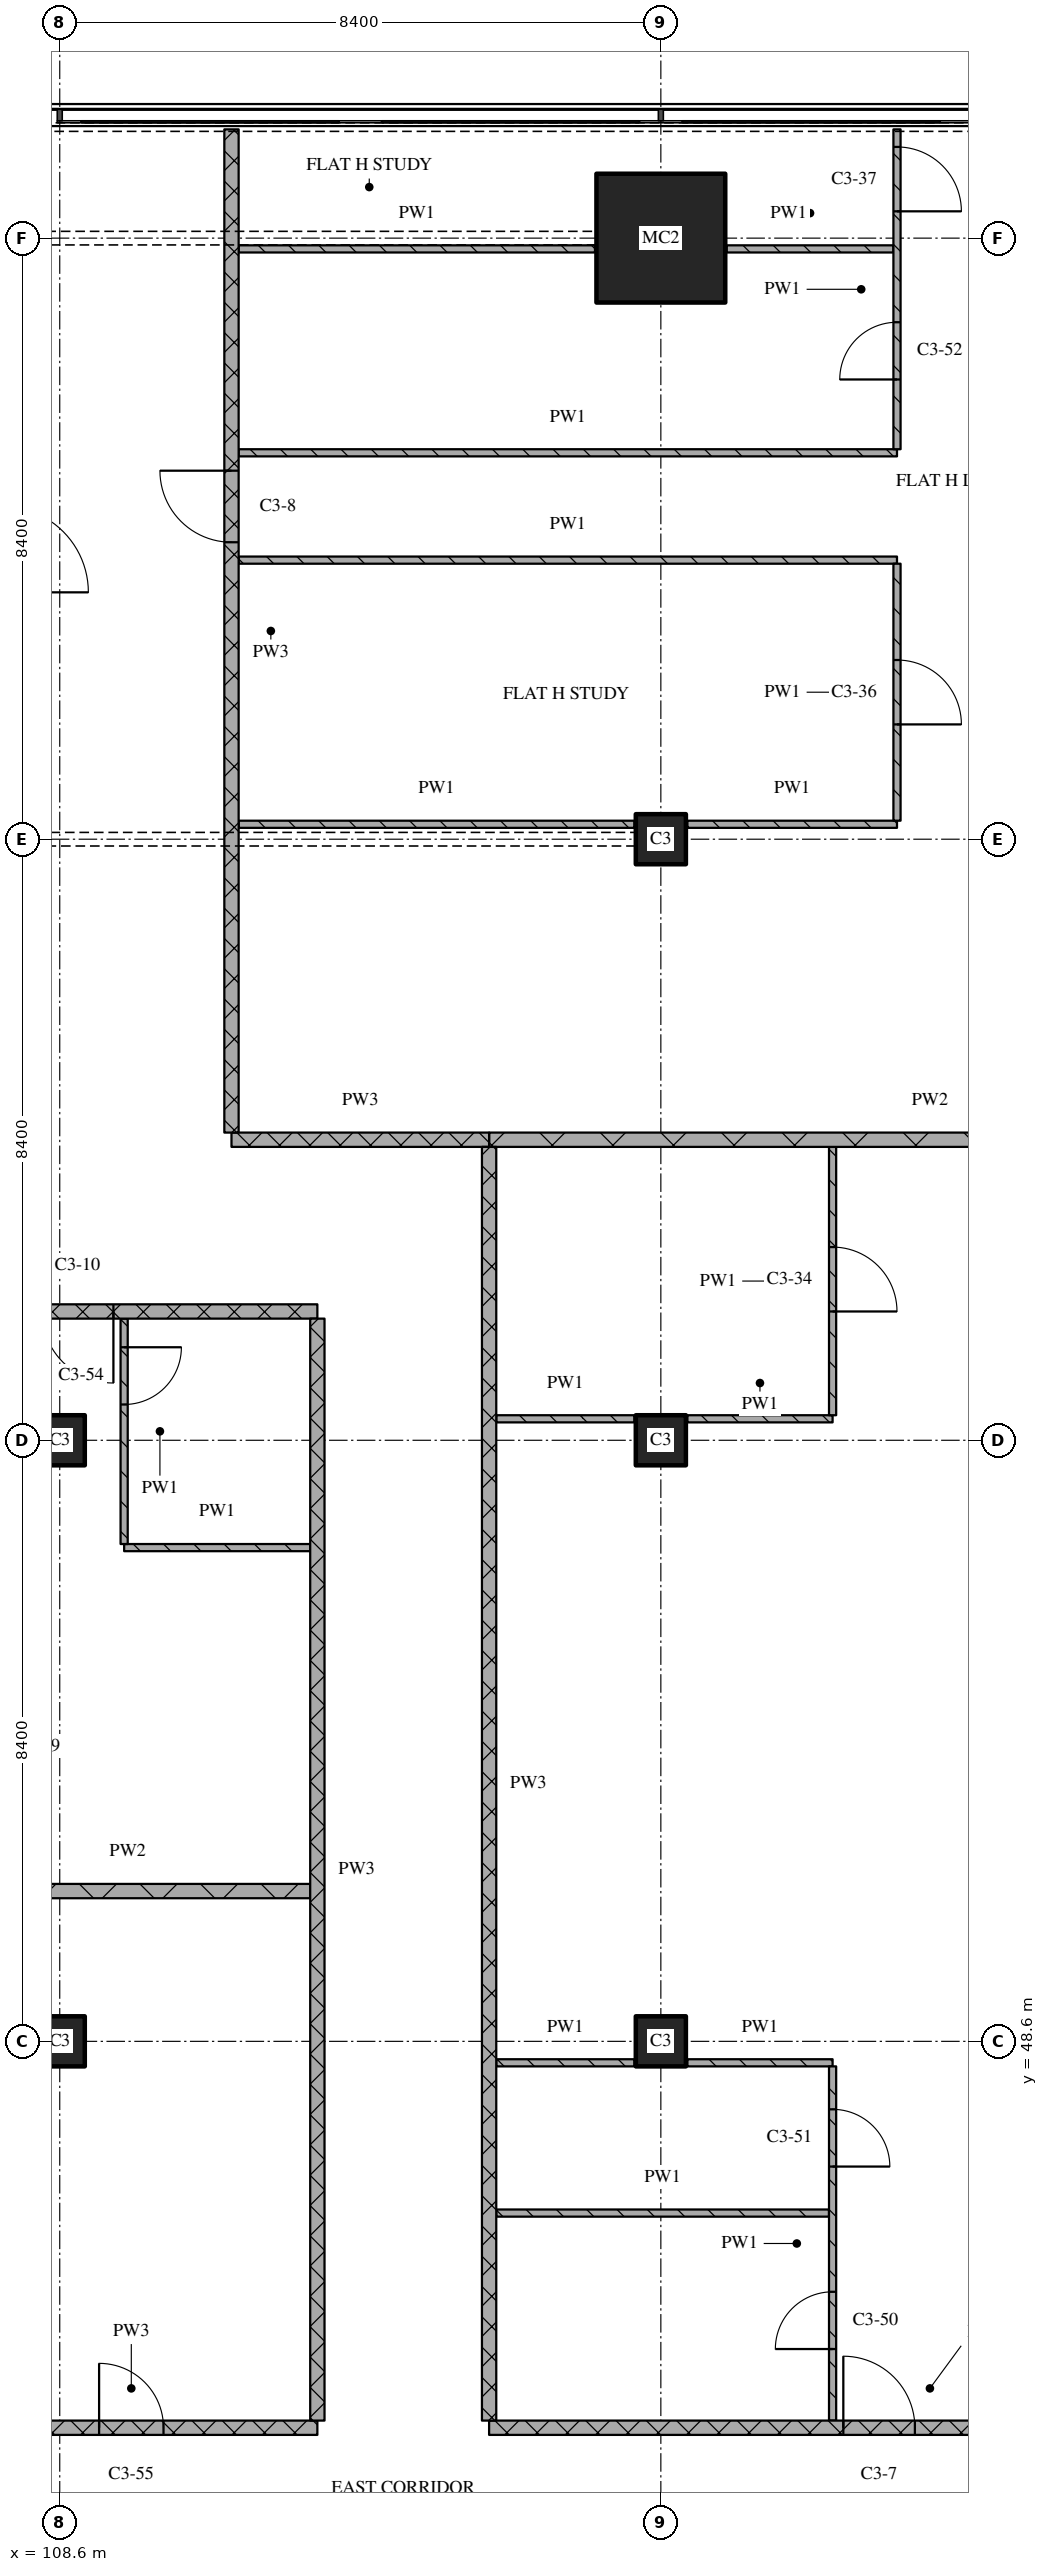
"""IFC4 building model, lengths in metres.
Left out: names, types, materials, properties, quantities, classifications, styles, units other than length and angle.
Written with IfcOpenShell. Run it as: python <this file> out.ifc"""

import sys

from ifc_helpers import new_model, si_unit, direction, frame, frame_2d, origin, origin_2d, place, context, subcontext, project, spatial, rectangle, extrude, element, fill, save


model = new_model("IFC4")
c1 = context("Model", 3, precision=1e-05, world=origin(), true_north=direction((0.0, 1.0)))
c2 = subcontext(c1, "Body", "Model", "MODEL_VIEW")
j1 = project(units=[si_unit("LENGTHUNIT", "METRE"), si_unit("PLANEANGLEUNIT", "RADIAN")], contexts=[c1])
p1 = place(None, origin())
s1 = spatial("IfcSite", under=j1, at=p1, CompositionType="ELEMENT")
p2 = place(p1, origin())
s2 = spatial("IfcBuilding", under=s1, at=p2, CompositionType="ELEMENT")
p3 = place(p2, frame((0.0, 0.0, 169.05)))
s3 = spatial("IfcBuildingStorey", under=s2, at=p3, CompositionType="ELEMENT", Elevation=169.05)
for number, where, z_axis, x_axis in (
    (1, (108.6, 48.6, 0.0), (0.0, 0.0, 1.0), (1.0, 0.0, 0.0)),
    (2, (108.6, 57.0, 0.0), (0.0, 0.0, 1.0), (1.0, 0.0, 0.0)),
    (3, (117.0, 48.6, 0.0), (0.0, 0.0, 1.0), (1.0, 0.0, 0.0)),
    (4, (117.0, 57.0, 0.0), (0.0, 0.0, 1.0), (1.0, 0.0, 0.0)),
    (5, (117.0, 65.4, 0.0), (0.0, 0.0, 1.0), (1.0, 0.0, 0.0)),
):
    element("IfcColumn", number, at=place(p3, frame(where, z_axis=z_axis, x_axis=x_axis)), inside=s3, PredefinedType="COLUMN", context=c2, shape_type="SweptSolid", body=[
        extrude(rectangle(XDim=0.7, YDim=0.7, at=origin_2d()), origin(), (0.0, 0.0, 1.0), 3.6),
    ])
p4 = place(p3, frame((117.0, 73.8, 0.0), z_axis=(0.0, 0.0, 1.0), x_axis=(1.0, 0.0, 0.0)))
e6 = element("IfcColumn", 6, at=p4, inside=s3, PredefinedType="COLUMN", context=c2, shape_type="SweptSolid", body=[
    extrude(rectangle(XDim=1.8, YDim=1.8, at=origin_2d()), origin(), (0.0, 0.0, 1.0), 3.6),
])
p5 = place(p3, frame((107.0, 43.2, 0.0), z_axis=(0.0, 0.0, 1.0), x_axis=(1.0, 0.0, 0.0)))
e7 = element("IfcWall", 7, at=p5, inside=s3, PredefinedType="PARTITIONING", context=c2, shape_type="SweptSolid", body=[
    extrude(rectangle(XDim=5.2, YDim=0.2, at=frame_2d((2.6, 0.0))), origin(), (0.0, 0.0, 1.0), 3.32),
])
p6 = place(p5, frame((2.15, 0.0, 0.0)))
e8 = element("IfcOpeningElement", 8, at=p6, cuts=e7, PredefinedType="OPENING", context=c2, shape_type="SweptSolid", body=[
    extrude(rectangle(XDim=0.9, YDim=2.1, at=frame_2d((0.45, 1.05))), frame((0.0, 0.11, 0.0), z_axis=(0.0, -1.0, 0.0), x_axis=(1.0, 0.0, 0.0)), (0.0, 0.0, 1.0), 0.22),
])
p7 = place(p3, frame((114.6, 43.2, 0.0), z_axis=(0.0, 0.0, 1.0), x_axis=(1.0, 0.0, 0.0)))
e9 = element("IfcWall", 9, at=p7, inside=s3, PredefinedType="PARTITIONING", context=c2, shape_type="SweptSolid", body=[
    extrude(rectangle(XDim=12.32, YDim=0.2, at=frame_2d((6.16, 0.0))), origin(), (0.0, 0.0, 1.0), 3.32),
])
p8 = place(p7, frame((4.95, 0.0, 0.0)))
e10 = element("IfcOpeningElement", 10, at=p8, cuts=e9, PredefinedType="OPENING", context=c2, shape_type="SweptSolid", body=[
    extrude(rectangle(XDim=1.0, YDim=2.1, at=frame_2d((0.5, 1.05))), frame((0.0, 0.11, 0.0), z_axis=(0.0, -1.0, 0.0), x_axis=(1.0, 0.0, 0.0)), (0.0, 0.0, 1.0), 0.22),
])
p9 = place(p3, frame((114.7, 46.2, 0.0), z_axis=(0.0, 0.0, 1.0), x_axis=(1.0, 0.0, 0.0)))
e11 = element("IfcWall", 11, at=p9, inside=s3, PredefinedType="PARTITIONING", context=c2, shape_type="SweptSolid", body=[
    extrude(rectangle(XDim=4.65, YDim=0.1, at=frame_2d((2.325, 0.0))), origin(), (0.0, 0.0, 1.0), 3.32),
])
p10 = place(p3, frame((114.7, 48.3, 0.0), z_axis=(0.0, 0.0, 1.0), x_axis=(1.0, 0.0, 0.0)))
e12 = element("IfcWall", 12, at=p10, inside=s3, PredefinedType="PARTITIONING", context=c2, shape_type="SweptSolid", body=[
    extrude(rectangle(XDim=1.93, YDim=0.1, at=frame_2d((0.965, 0.0))), origin(), (0.0, 0.0, 1.0), 3.32),
])
p11 = place(p3, frame((117.37, 48.3, 0.0), z_axis=(0.0, 0.0, 1.0), x_axis=(1.0, 0.0, 0.0)))
e13 = element("IfcWall", 13, at=p11, inside=s3, PredefinedType="PARTITIONING", context=c2, shape_type="SweptSolid", body=[
    extrude(rectangle(XDim=2.03, YDim=0.1, at=frame_2d((1.015, 0.0))), origin(), (0.0, 0.0, 1.0), 3.32),
])
p12 = place(p3, frame((107.0, 50.7, 0.0), z_axis=(0.0, 0.0, 1.0), x_axis=(1.0, 0.0, 0.0)))
e14 = element("IfcWall", 14, at=p12, inside=s3, PredefinedType="PARTITIONING", context=c2, shape_type="SweptSolid", body=[
    extrude(rectangle(XDim=5.1, YDim=0.2, at=frame_2d((2.55, 0.0))), origin(), (0.0, 0.0, 1.0), 3.32),
])
p13 = place(p3, frame((109.5, 55.5, 0.0), z_axis=(0.0, 0.0, 1.0), x_axis=(1.0, 0.0, 0.0)))
e15 = element("IfcWall", 15, at=p13, inside=s3, PredefinedType="PARTITIONING", context=c2, shape_type="SweptSolid", body=[
    extrude(rectangle(XDim=2.6, YDim=0.1, at=frame_2d((1.3, 0.0))), origin(), (0.0, 0.0, 1.0), 3.32),
])
p14 = place(p3, frame((114.7, 57.3, 0.0), z_axis=(0.0, 0.0, 1.0), x_axis=(1.0, 0.0, 0.0)))
e16 = element("IfcWall", 16, at=p14, inside=s3, PredefinedType="PARTITIONING", context=c2, shape_type="SweptSolid", body=[
    extrude(rectangle(XDim=1.93, YDim=0.1, at=frame_2d((0.965, 0.0))), origin(), (0.0, 0.0, 1.0), 3.32),
])
p15 = place(p3, frame((117.37, 57.3, 0.0), z_axis=(0.0, 0.0, 1.0), x_axis=(1.0, 0.0, 0.0)))
e17 = element("IfcWall", 17, at=p15, inside=s3, PredefinedType="PARTITIONING", context=c2, shape_type="SweptSolid", body=[
    extrude(rectangle(XDim=2.03, YDim=0.1, at=frame_2d((1.015, 0.0))), origin(), (0.0, 0.0, 1.0), 3.32),
])
p16 = place(p3, frame((112.2, 58.8, 0.0), z_axis=(0.0, 0.0, 1.0), x_axis=(-1.0, 0.0, 0.0)))
e18 = element("IfcWall", 18, at=p16, inside=s3, PredefinedType="PARTITIONING", context=c2, shape_type="SweptSolid", body=[
    extrude(rectangle(XDim=10.8, YDim=0.2, at=frame_2d((5.4, 0.0))), origin(), (0.0, 0.0, 1.0), 3.32),
])
p17 = place(p16, frame((2.85, 0.0, 0.0)))
e19 = element("IfcOpeningElement", 19, at=p17, cuts=e18, PredefinedType="OPENING", context=c2, shape_type="SweptSolid", body=[
    extrude(rectangle(XDim=1.0, YDim=2.1, at=frame_2d((0.5, 1.05))), frame((0.0, 0.11, 0.0), z_axis=(0.0, -1.0, 0.0), x_axis=(1.0, 0.0, 0.0)), (0.0, 0.0, 1.0), 0.22),
])
p18 = place(p3, frame((111.0, 61.2, 0.0), z_axis=(0.0, 0.0, 1.0), x_axis=(1.0, 0.0, 0.0)))
e20 = element("IfcWall", 20, at=p18, inside=s3, PredefinedType="PARTITIONING", context=c2, shape_type="SweptSolid", body=[
    extrude(rectangle(XDim=3.6, YDim=0.2, at=frame_2d((1.8, 0.0))), origin(), (0.0, 0.0, 1.0), 3.32),
])
p19 = place(p3, frame((114.6, 61.2, 0.0), z_axis=(0.0, 0.0, 1.0), x_axis=(1.0, 0.0, 0.0)))
e21 = element("IfcWall", 21, at=p19, inside=s3, PredefinedType="PARTITIONING", context=c2, shape_type="SweptSolid", body=[
    extrude(rectangle(XDim=12.32, YDim=0.2, at=frame_2d((6.16, 0.0))), origin(), (0.0, 0.0, 1.0), 3.32),
])
p20 = place(p3, frame((111.1, 65.609, 0.0), z_axis=(0.0, 0.0, 1.0), x_axis=(1.0, 0.0, 0.0)))
e22 = element("IfcWall", 22, at=p20, inside=s3, PredefinedType="PARTITIONING", context=c2, shape_type="SweptSolid", body=[
    extrude(rectangle(XDim=5.53, YDim=0.1, at=frame_2d((2.765, 0.0))), origin(), (0.0, 0.0, 1.0), 3.32),
])
p21 = place(p3, frame((117.37, 65.609, 0.0), z_axis=(0.0, 0.0, 1.0), x_axis=(1.0, 0.0, 0.0)))
e23 = element("IfcWall", 23, at=p21, inside=s3, PredefinedType="PARTITIONING", context=c2, shape_type="SweptSolid", body=[
    extrude(rectangle(XDim=2.93, YDim=0.1, at=frame_2d((1.465, 0.0))), origin(), (0.0, 0.0, 1.0), 3.32),
])
for number, where, z_axis, x_axis in (
    (24, (111.1, 69.3, 0.0), (0.0, 0.0, 1.0), (1.0, 0.0, 0.0)),
    (25, (111.1, 70.8, 0.0), (0.0, 0.0, 1.0), (1.0, 0.0, 0.0)),
):
    element("IfcWall", number, at=place(p3, frame(where, z_axis=z_axis, x_axis=x_axis)), inside=s3, PredefinedType="PARTITIONING", context=c2, shape_type="SweptSolid", body=[
        extrude(rectangle(XDim=9.2, YDim=0.1, at=frame_2d((4.6, 0.0))), origin(), (0.0, 0.0, 1.0), 3.32),
    ])
p22 = place(p3, frame((111.1, 73.649, 0.0), z_axis=(0.0, 0.0, 1.0), x_axis=(1.0, 0.0, 0.0)))
e26 = element("IfcWall", 26, at=p22, inside=s3, PredefinedType="PARTITIONING", context=c2, shape_type="SweptSolid", body=[
    extrude(rectangle(XDim=4.98, YDim=0.1, at=frame_2d((2.49, 0.0))), origin(), (0.0, 0.0, 1.0), 3.32),
])
p23 = place(p3, frame((117.92, 73.649, 0.0), z_axis=(0.0, 0.0, 1.0), x_axis=(1.0, 0.0, 0.0)))
e27 = element("IfcWall", 27, at=p23, inside=s3, PredefinedType="PARTITIONING", context=c2, shape_type="SweptSolid", body=[
    extrude(rectangle(XDim=2.33, YDim=0.1, at=frame_2d((1.165, 0.0))), origin(), (0.0, 0.0, 1.0), 3.32),
])
p24 = place(p3, frame((109.5, 58.7, 0.0), z_axis=(0.0, 0.0, 1.0), x_axis=(0.0, -1.0, 0.0)))
e28 = element("IfcWall", 28, at=p24, inside=s3, PredefinedType="PARTITIONING", context=c2, shape_type="SweptSolid", body=[
    extrude(rectangle(XDim=3.15, YDim=0.1, at=frame_2d((1.575, 0.0))), origin(), (0.0, 0.0, 1.0), 3.32),
])
p25 = place(p24, frame((0.4, 0.0, 0.0)))
e29 = element("IfcOpeningElement", 29, at=p25, cuts=e28, PredefinedType="OPENING", context=c2, shape_type="SweptSolid", body=[
    extrude(rectangle(XDim=0.8, YDim=2.1, at=frame_2d((0.4, 1.05))), frame((0.0, 0.06, 0.0), z_axis=(0.0, -1.0, 0.0), x_axis=(1.0, 0.0, 0.0)), (0.0, 0.0, 1.0), 0.12),
])
p26 = place(p3, frame((111.0, 75.32, 0.0), z_axis=(0.0, 0.0, 1.0), x_axis=(0.0, -1.0, 0.0)))
e30 = element("IfcWall", 30, at=p26, inside=s3, PredefinedType="PARTITIONING", context=c2, shape_type="SweptSolid", body=[
    extrude(rectangle(XDim=14.02, YDim=0.2, at=frame_2d((7.01, 0.0))), origin(), (0.0, 0.0, 1.0), 3.32),
])
p27 = place(p26, frame((4.77, 0.0, 0.0)))
e31 = element("IfcOpeningElement", 31, at=p27, cuts=e30, PredefinedType="OPENING", context=c2, shape_type="SweptSolid", body=[
    extrude(rectangle(XDim=1.0, YDim=2.1, at=frame_2d((0.5, 1.05))), frame((0.0, 0.11, 0.0), z_axis=(0.0, -1.0, 0.0), x_axis=(1.0, 0.0, 0.0)), (0.0, 0.0, 1.0), 0.22),
])
p28 = place(p3, frame((112.2, 58.7, 0.0), z_axis=(0.0, 0.0, 1.0), x_axis=(0.0, -1.0, 0.0)))
e32 = element("IfcWall", 32, at=p28, inside=s3, PredefinedType="PARTITIONING", context=c2, shape_type="SweptSolid", body=[
    extrude(rectangle(XDim=15.4, YDim=0.2, at=frame_2d((7.7, 0.0))), origin(), (0.0, 0.0, 1.0), 3.32),
])
p29 = place(p3, frame((114.6, 61.1, 0.0), z_axis=(0.0, 0.0, 1.0), x_axis=(0.0, -1.0, 0.0)))
e33 = element("IfcWall", 33, at=p29, inside=s3, PredefinedType="PARTITIONING", context=c2, shape_type="SweptSolid", body=[
    extrude(rectangle(XDim=17.8, YDim=0.2, at=frame_2d((8.9, 0.0))), origin(), (0.0, 0.0, 1.0), 3.32),
])
p30 = place(p3, frame((119.4, 43.3, 0.0), z_axis=(0.0, 0.0, 1.0), x_axis=(0.0, 1.0, 0.0)))
e34 = element("IfcWall", 34, at=p30, inside=s3, PredefinedType="PARTITIONING", context=c2, shape_type="SweptSolid", body=[
    extrude(rectangle(XDim=4.95, YDim=0.1, at=frame_2d((2.475, 0.0))), origin(), (0.0, 0.0, 1.0), 3.32),
])
p31 = place(p30, frame((1.0, 0.0, 0.0)))
e35 = element("IfcOpeningElement", 35, at=p31, cuts=e34, PredefinedType="OPENING", context=c2, shape_type="SweptSolid", body=[
    extrude(rectangle(XDim=0.8, YDim=2.1, at=frame_2d((0.4, 1.05))), frame((0.0, 0.06, 0.0), z_axis=(0.0, -1.0, 0.0), x_axis=(1.0, 0.0, 0.0)), (0.0, 0.0, 1.0), 0.12),
])
p32 = place(p30, frame((3.55, 0.0, 0.0)))
e36 = element("IfcOpeningElement", 36, at=p32, cuts=e34, PredefinedType="OPENING", context=c2, shape_type="SweptSolid", body=[
    extrude(rectangle(XDim=0.8, YDim=2.1, at=frame_2d((0.4, 1.05))), frame((0.0, 0.06, 0.0), z_axis=(0.0, -1.0, 0.0), x_axis=(1.0, 0.0, 0.0)), (0.0, 0.0, 1.0), 0.12),
])
p33 = place(p3, frame((119.4, 57.35, 0.0), z_axis=(0.0, 0.0, 1.0), x_axis=(0.0, 1.0, 0.0)))
e37 = element("IfcWall", 37, at=p33, inside=s3, PredefinedType="PARTITIONING", context=c2, shape_type="SweptSolid", body=[
    extrude(rectangle(XDim=3.75, YDim=0.1, at=frame_2d((1.875, 0.0))), origin(), (0.0, 0.0, 1.0), 3.32),
])
p34 = place(p33, frame((1.45, 0.0, 0.0)))
e38 = element("IfcOpeningElement", 38, at=p34, cuts=e37, PredefinedType="OPENING", context=c2, shape_type="SweptSolid", body=[
    extrude(rectangle(XDim=0.9, YDim=2.1, at=frame_2d((0.45, 1.05))), frame((0.0, 0.06, 0.0), z_axis=(0.0, -1.0, 0.0), x_axis=(1.0, 0.0, 0.0)), (0.0, 0.0, 1.0), 0.12),
])
p35 = place(p3, frame((120.3, 65.659, 0.0), z_axis=(0.0, 0.0, 1.0), x_axis=(0.0, 1.0, 0.0)))
e39 = element("IfcWall", 39, at=p35, inside=s3, PredefinedType="PARTITIONING", context=c2, shape_type="SweptSolid", body=[
    extrude(rectangle(XDim=3.591, YDim=0.1, at=frame_2d((1.796, 0.0))), origin(), (0.0, 0.0, 1.0), 3.32),
])
p36 = place(p35, frame((1.346, 0.0, 0.0)))
e40 = element("IfcOpeningElement", 40, at=p36, cuts=e39, PredefinedType="OPENING", context=c2, shape_type="SweptSolid", body=[
    extrude(rectangle(XDim=0.9, YDim=2.1, at=frame_2d((0.45, 1.05))), frame((0.0, 0.06, 0.0), z_axis=(0.0, -1.0, 0.0), x_axis=(1.0, 0.0, 0.0)), (0.0, 0.0, 1.0), 0.12),
])
p37 = place(p3, frame((120.3, 70.85, 0.0), z_axis=(0.0, 0.0, 1.0), x_axis=(0.0, 1.0, 0.0)))
e41 = element("IfcWall", 41, at=p37, inside=s3, PredefinedType="PARTITIONING", context=c2, shape_type="SweptSolid", body=[
    extrude(rectangle(XDim=4.47, YDim=0.1, at=frame_2d((2.235, 0.0))), origin(), (0.0, 0.0, 1.0), 3.32),
])
p38 = place(p37, frame((0.975, 0.0, 0.0)))
e42 = element("IfcOpeningElement", 42, at=p38, cuts=e41, PredefinedType="OPENING", context=c2, shape_type="SweptSolid", body=[
    extrude(rectangle(XDim=0.8, YDim=2.1, at=frame_2d((0.4, 1.05))), frame((0.0, 0.06, 0.0), z_axis=(0.0, -1.0, 0.0), x_axis=(1.0, 0.0, 0.0)), (0.0, 0.0, 1.0), 0.12),
])
p39 = place(p37, frame((3.325, 0.0, 0.0)))
e43 = element("IfcOpeningElement", 43, at=p39, cuts=e41, PredefinedType="OPENING", context=c2, shape_type="SweptSolid", body=[
    extrude(rectangle(XDim=0.9, YDim=2.1, at=frame_2d((0.45, 1.05))), frame((0.0, 0.06, 0.0), z_axis=(0.0, -1.0, 0.0), x_axis=(1.0, 0.0, 0.0)), (0.0, 0.0, 1.0), 0.12),
])
p40 = place(p6, origin())
e44 = element("IfcDoor", 44, at=p40, inside=s3, OperationType="SINGLE_SWING_LEFT", PredefinedType="DOOR", context=c2, shape_type="SweptSolid", body=[
    extrude(rectangle(XDim=0.9, YDim=2.1, at=frame_2d((0.45, 1.05))), frame((0.0, 0.025, 0.0), z_axis=(0.0, -1.0, 0.0), x_axis=(1.0, 0.0, 0.0)), (0.0, 0.0, 1.0), 0.05),
])
fill(e8, e44)
p41 = place(p8, origin())
e45 = element("IfcDoor", 45, at=p41, inside=s3, OperationType="SINGLE_SWING_LEFT", PredefinedType="DOOR", context=c2, shape_type="SweptSolid", body=[
    extrude(rectangle(XDim=1.0, YDim=2.1, at=frame_2d((0.5, 1.05))), frame((0.0, 0.025, 0.0), z_axis=(0.0, -1.0, 0.0), x_axis=(1.0, 0.0, 0.0)), (0.0, 0.0, 1.0), 0.05),
])
fill(e10, e45)
p42 = place(p17, origin())
e46 = element("IfcDoor", 46, at=p42, inside=s3, OperationType="SINGLE_SWING_LEFT", PredefinedType="DOOR", context=c2, shape_type="SweptSolid", body=[
    extrude(rectangle(XDim=1.0, YDim=2.1, at=frame_2d((0.5, 1.05))), frame((0.0, 0.025, 0.0), z_axis=(0.0, -1.0, 0.0), x_axis=(1.0, 0.0, 0.0)), (0.0, 0.0, 1.0), 0.05),
])
fill(e19, e46)
p43 = place(p25, origin())
e47 = element("IfcDoor", 47, at=p43, inside=s3, OperationType="SINGLE_SWING_LEFT", PredefinedType="DOOR", context=c2, shape_type="SweptSolid", body=[
    extrude(rectangle(XDim=0.8, YDim=2.1, at=frame_2d((0.4, 1.05))), frame((0.0, 0.025, 0.0), z_axis=(0.0, -1.0, 0.0), x_axis=(1.0, 0.0, 0.0)), (0.0, 0.0, 1.0), 0.05),
])
fill(e29, e47)
p44 = place(p27, origin())
e48 = element("IfcDoor", 48, at=p44, inside=s3, OperationType="SINGLE_SWING_RIGHT", PredefinedType="DOOR", context=c2, shape_type="SweptSolid", body=[
    extrude(rectangle(XDim=1.0, YDim=2.1, at=frame_2d((0.5, 1.05))), frame((0.0, 0.025, 0.0), z_axis=(0.0, -1.0, 0.0), x_axis=(1.0, 0.0, 0.0)), (0.0, 0.0, 1.0), 0.05),
])
fill(e31, e48)
p45 = place(p31, origin())
e49 = element("IfcDoor", 49, at=p45, inside=s3, OperationType="SINGLE_SWING_LEFT", PredefinedType="DOOR", context=c2, shape_type="SweptSolid", body=[
    extrude(rectangle(XDim=0.8, YDim=2.1, at=frame_2d((0.4, 1.05))), frame((0.0, 0.025, 0.0), z_axis=(0.0, -1.0, 0.0), x_axis=(1.0, 0.0, 0.0)), (0.0, 0.0, 1.0), 0.05),
])
fill(e35, e49)
p46 = place(p32, origin())
e50 = element("IfcDoor", 50, at=p46, inside=s3, OperationType="SINGLE_SWING_RIGHT", PredefinedType="DOOR", context=c2, shape_type="SweptSolid", body=[
    extrude(rectangle(XDim=0.8, YDim=2.1, at=frame_2d((0.4, 1.05))), frame((0.0, 0.025, 0.0), z_axis=(0.0, -1.0, 0.0), x_axis=(1.0, 0.0, 0.0)), (0.0, 0.0, 1.0), 0.05),
])
fill(e36, e50)
p47 = place(p34, origin())
e51 = element("IfcDoor", 51, at=p47, inside=s3, OperationType="SINGLE_SWING_RIGHT", PredefinedType="DOOR", context=c2, shape_type="SweptSolid", body=[
    extrude(rectangle(XDim=0.9, YDim=2.1, at=frame_2d((0.45, 1.05))), frame((0.0, 0.025, 0.0), z_axis=(0.0, -1.0, 0.0), x_axis=(1.0, 0.0, 0.0)), (0.0, 0.0, 1.0), 0.05),
])
fill(e38, e51)
p48 = place(p36, origin())
e52 = element("IfcDoor", 52, at=p48, inside=s3, OperationType="SINGLE_SWING_RIGHT", PredefinedType="DOOR", context=c2, shape_type="SweptSolid", body=[
    extrude(rectangle(XDim=0.9, YDim=2.1, at=frame_2d((0.45, 1.05))), frame((0.0, 0.025, 0.0), z_axis=(0.0, -1.0, 0.0), x_axis=(1.0, 0.0, 0.0)), (0.0, 0.0, 1.0), 0.05),
])
fill(e40, e52)
p49 = place(p38, origin())
e53 = element("IfcDoor", 53, at=p49, inside=s3, OperationType="SINGLE_SWING_LEFT", PredefinedType="DOOR", context=c2, shape_type="SweptSolid", body=[
    extrude(rectangle(XDim=0.8, YDim=2.1, at=frame_2d((0.4, 1.05))), frame((0.0, 0.025, 0.0), z_axis=(0.0, -1.0, 0.0), x_axis=(1.0, 0.0, 0.0)), (0.0, 0.0, 1.0), 0.05),
])
fill(e42, e53)
p50 = place(p39, origin())
e54 = element("IfcDoor", 54, at=p50, inside=s3, OperationType="SINGLE_SWING_RIGHT", PredefinedType="DOOR", context=c2, shape_type="SweptSolid", body=[
    extrude(rectangle(XDim=0.9, YDim=2.1, at=frame_2d((0.45, 1.05))), frame((0.0, 0.025, 0.0), z_axis=(0.0, -1.0, 0.0), x_axis=(1.0, 0.0, 0.0)), (0.0, 0.0, 1.0), 0.05),
])
fill(e43, e54)
save(model, sys.argv[1])
